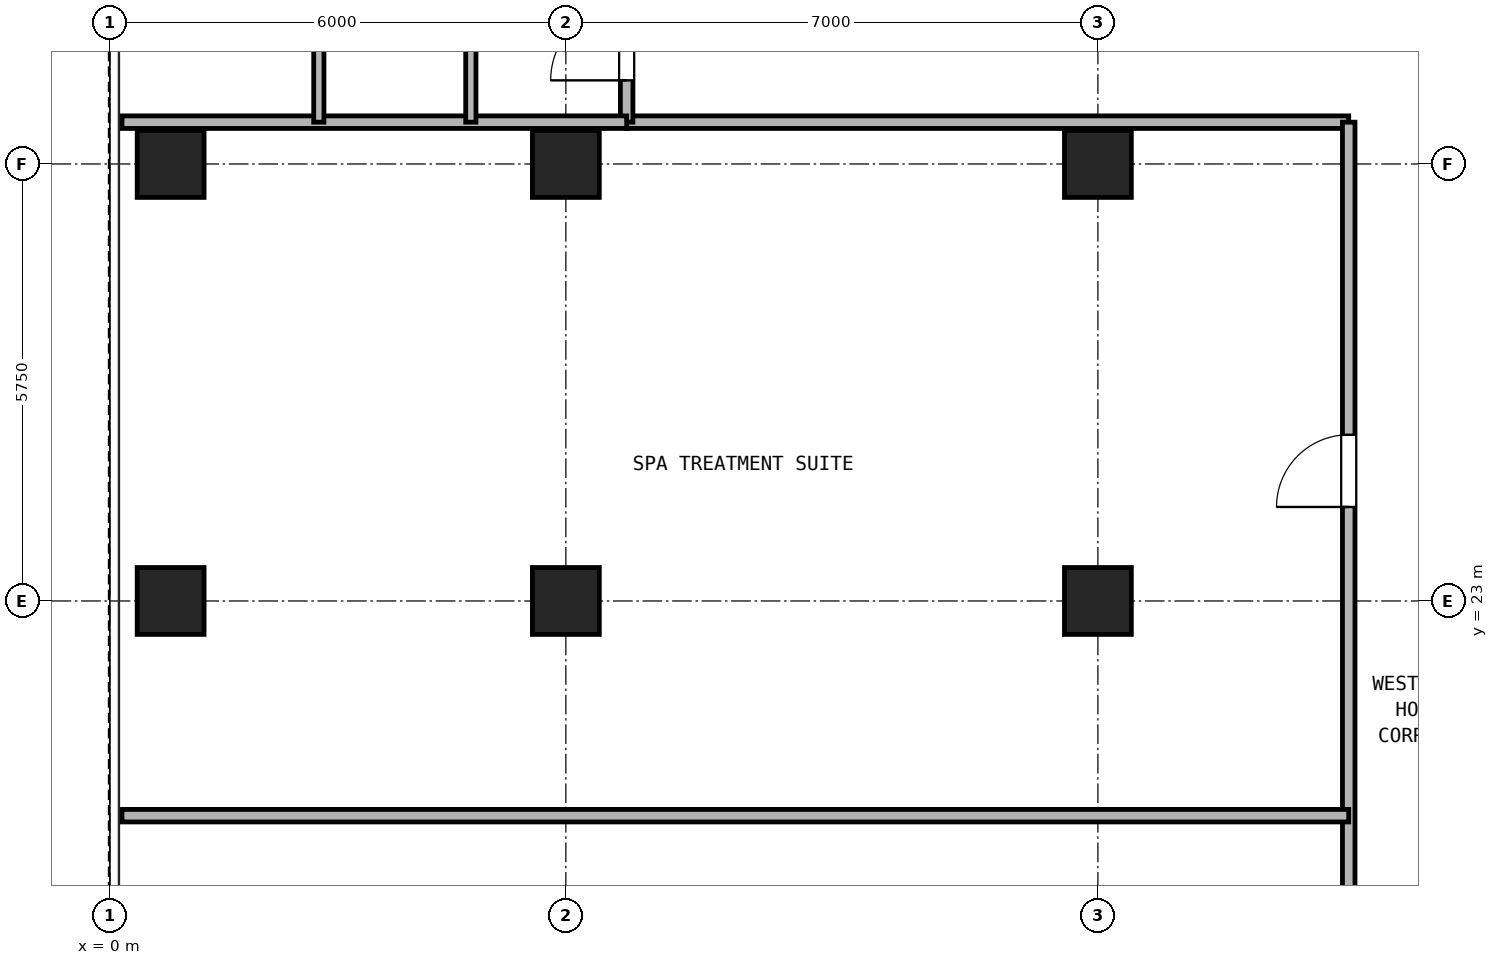
"""IFC4 building model, lengths in metres.
Left out: names, types, materials, properties, quantities, classifications, styles, units other than length and angle.
Written with IfcOpenShell. Run it as: python <this file> out.ifc"""

import sys

from ifc_helpers import new_model, si_unit, direction, frame, frame_2d, origin, origin_2d, place, context, subcontext, project, spatial, rectangle, hollow_rectangle, extrude, source, transform, mapped, element, fill, save


model = new_model("IFC4")
c1 = context("Model", 3, precision=1e-05, world=origin(), true_north=direction((0.0, 1.0)))
c2 = subcontext(c1, "Body", "Model", "MODEL_VIEW")
j1 = project(units=[si_unit("LENGTHUNIT", "METRE"), si_unit("PLANEANGLEUNIT", "RADIAN")], contexts=[c1])
p1 = place(None, origin())
s1 = spatial("IfcSite", under=j1, at=p1, CompositionType="ELEMENT")
p2 = place(p1, origin())
s2 = spatial("IfcBuilding", under=s1, at=p2, CompositionType="ELEMENT")
p3 = place(p2, frame((0.0, 0.0, 95.9)))
s3 = spatial("IfcBuildingStorey", under=s2, at=p3, CompositionType="ELEMENT", Elevation=95.9)
m1 = source(origin(), c2, "Body", "SweptSolid", [
    extrude(hollow_rectangle(XDim=0.88, YDim=0.88, WallThickness=0.05, at=origin_2d()), origin(), (0.0, 0.0, 1.0), 2.95),
])
for number, where, z_axis, x_axis in (
    (1, (0.8, 23.0, 0.0), (0.0, 0.0, 1.0), (1.0, 0.0, 0.0)),
    (2, (0.8, 28.75, 0.0), (0.0, 0.0, 1.0), (1.0, 0.0, 0.0)),
    (3, (6.0, 23.0, 0.0), (0.0, 0.0, 1.0), (1.0, 0.0, 0.0)),
    (4, (6.0, 28.75, 0.0), (0.0, 0.0, 1.0), (1.0, 0.0, 0.0)),
    (5, (13.0, 23.0, 0.0), (0.0, 0.0, 1.0), (1.0, 0.0, 0.0)),
    (6, (13.0, 28.75, 0.0), (0.0, 0.0, 1.0), (1.0, 0.0, 0.0)),
):
    element("IfcColumn", number, at=place(p3, frame(where, z_axis=z_axis, x_axis=x_axis)), inside=s3, PredefinedType="COLUMN", context=c2, shape_type="MappedRepresentation", body=[
        mapped(m1, transform((0.0, 0.0, 0.0), x_axis=(1.0, 0.0, 0.0), y_axis=(0.0, 1.0, 0.0), z_axis=(0.0, 0.0, 1.0), scale=1.0)),
    ])
p4 = place(p3, frame((6.8, 29.3, 0.0), z_axis=(0.0, 0.0, 1.0), x_axis=(1.0, 0.0, 0.0)))
e7 = element("IfcWall", 7, at=p4, inside=s3, PredefinedType="PARTITIONING", context=c2, shape_type="SweptSolid", body=[
    extrude(rectangle(XDim=9.5, YDim=0.165, at=frame_2d((4.75, 0.0))), origin(), (0.0, 0.0, 1.0), 2.95),
])
p5 = place(p3, frame((16.3, 11.05, 0.0), z_axis=(0.0, 0.0, 1.0), x_axis=(0.0, 1.0, 0.0)))
e8 = element("IfcWall", 8, at=p5, inside=s3, PredefinedType="PARTITIONING", context=c2, shape_type="SweptSolid", body=[
    extrude(rectangle(XDim=18.25, YDim=0.165, at=frame_2d((9.125, 0.0))), origin(), (0.0, 0.0, 1.0), 2.95),
])
p6 = place(p5, frame((4.062, 0.0, 0.0)))
e9 = element("IfcOpeningElement", 9, at=p6, cuts=e8, PredefinedType="OPENING", context=c2, shape_type="SweptSolid", body=[
    extrude(rectangle(XDim=0.95, YDim=2.15, at=frame_2d((0.475, 1.075))), frame((0.0, 0.093, 0.0), z_axis=(0.0, -1.0, 0.0), x_axis=(1.0, 0.0, 0.0)), (0.0, 0.0, 1.0), 0.185),
])
p7 = place(p5, frame((13.187, 0.0, 0.0)))
e10 = element("IfcOpeningElement", 10, at=p7, cuts=e8, PredefinedType="OPENING", context=c2, shape_type="SweptSolid", body=[
    extrude(rectangle(XDim=0.95, YDim=2.15, at=frame_2d((0.475, 1.075))), frame((0.0, 0.093, 0.0), z_axis=(0.0, -1.0, 0.0), x_axis=(1.0, 0.0, 0.0)), (0.0, 0.0, 1.0), 0.185),
])
p8 = place(p3, frame((6.8, 29.3, 0.0), z_axis=(0.0, 0.0, 1.0), x_axis=(0.0, 1.0, 0.0)))
e11 = element("IfcWall", 11, at=p8, inside=s3, PredefinedType="PARTITIONING", context=c2, shape_type="SweptSolid", body=[
    extrude(rectangle(XDim=5.84, YDim=0.165, at=frame_2d((2.92, 0.0))), origin(), (0.0, 0.0, 1.0), 2.95),
])
p9 = place(p8, frame((0.55, 0.0, 0.0)))
e12 = element("IfcOpeningElement", 12, at=p9, cuts=e11, PredefinedType="OPENING", context=c2, shape_type="SweptSolid", body=[
    extrude(rectangle(XDim=1.0, YDim=2.15, at=frame_2d((0.5, 1.075))), frame((0.0, 0.093, 0.0), z_axis=(0.0, -1.0, 0.0), x_axis=(1.0, 0.0, 0.0)), (0.0, 0.0, 1.0), 0.185),
])
p10 = place(p3, frame((0.16, 29.3, 0.0), z_axis=(0.0, 0.0, 1.0), x_axis=(1.0, 0.0, 0.0)))
e13 = element("IfcWall", 13, at=p10, inside=s3, PredefinedType="PARTITIONING", context=c2, shape_type="SweptSolid", body=[
    extrude(rectangle(XDim=6.64, YDim=0.165, at=frame_2d((3.32, 0.0))), origin(), (0.0, 0.0, 1.0), 2.95),
])
for number, where, z_axis, x_axis in (
    (14, (2.75, 29.3, 0.0), (0.0, 0.0, 1.0), (0.0, 1.0, 0.0)),
    (15, (4.75, 29.3, 0.0), (0.0, 0.0, 1.0), (0.0, 1.0, 0.0)),
):
    element("IfcWall", number, at=place(p3, frame(where, z_axis=z_axis, x_axis=x_axis)), inside=s3, PredefinedType="PARTITIONING", context=c2, shape_type="SweptSolid", body=[
        extrude(rectangle(XDim=2.1, YDim=0.135, at=frame_2d((1.05, 0.0))), origin(), (0.0, 0.0, 1.0), 2.95),
    ])
p11 = place(p3, frame((0.16, 20.175, 0.0), z_axis=(0.0, 0.0, 1.0), x_axis=(1.0, 0.0, 0.0)))
e16 = element("IfcWall", 16, at=p11, inside=s3, PredefinedType="PARTITIONING", context=c2, shape_type="SweptSolid", body=[
    extrude(rectangle(XDim=16.14, YDim=0.165, at=frame_2d((8.07, 0.0))), origin(), (0.0, 0.0, 1.0), 2.583),
])
p12 = place(p9, origin())
e17 = element("IfcDoor", 17, at=p12, inside=s3, OperationType="SINGLE_SWING_LEFT", PredefinedType="DOOR", context=c2, shape_type="SweptSolid", body=[
    extrude(rectangle(XDim=1.0, YDim=2.15, at=frame_2d((0.5, 1.075))), frame((0.0, 0.025, 0.0), z_axis=(0.0, -1.0, 0.0), x_axis=(1.0, 0.0, 0.0)), (0.0, 0.0, 1.0), 0.05),
])
fill(e12, e17)
p13 = place(p7, frame((0.95, 0.0, 0.0), z_axis=(0.0, 0.0, 1.0), x_axis=(-1.0, 0.0, 0.0)))
e18 = element("IfcDoor", 18, at=p13, inside=s3, OperationType="SINGLE_SWING_LEFT", PredefinedType="DOOR", context=c2, shape_type="SweptSolid", body=[
    extrude(rectangle(XDim=0.95, YDim=2.15, at=frame_2d((0.475, 1.075))), frame((0.0, 0.025, 0.0), z_axis=(0.0, -1.0, 0.0), x_axis=(1.0, 0.0, 0.0)), (0.0, 0.0, 1.0), 0.05),
])
fill(e10, e18)
save(model, sys.argv[1])
